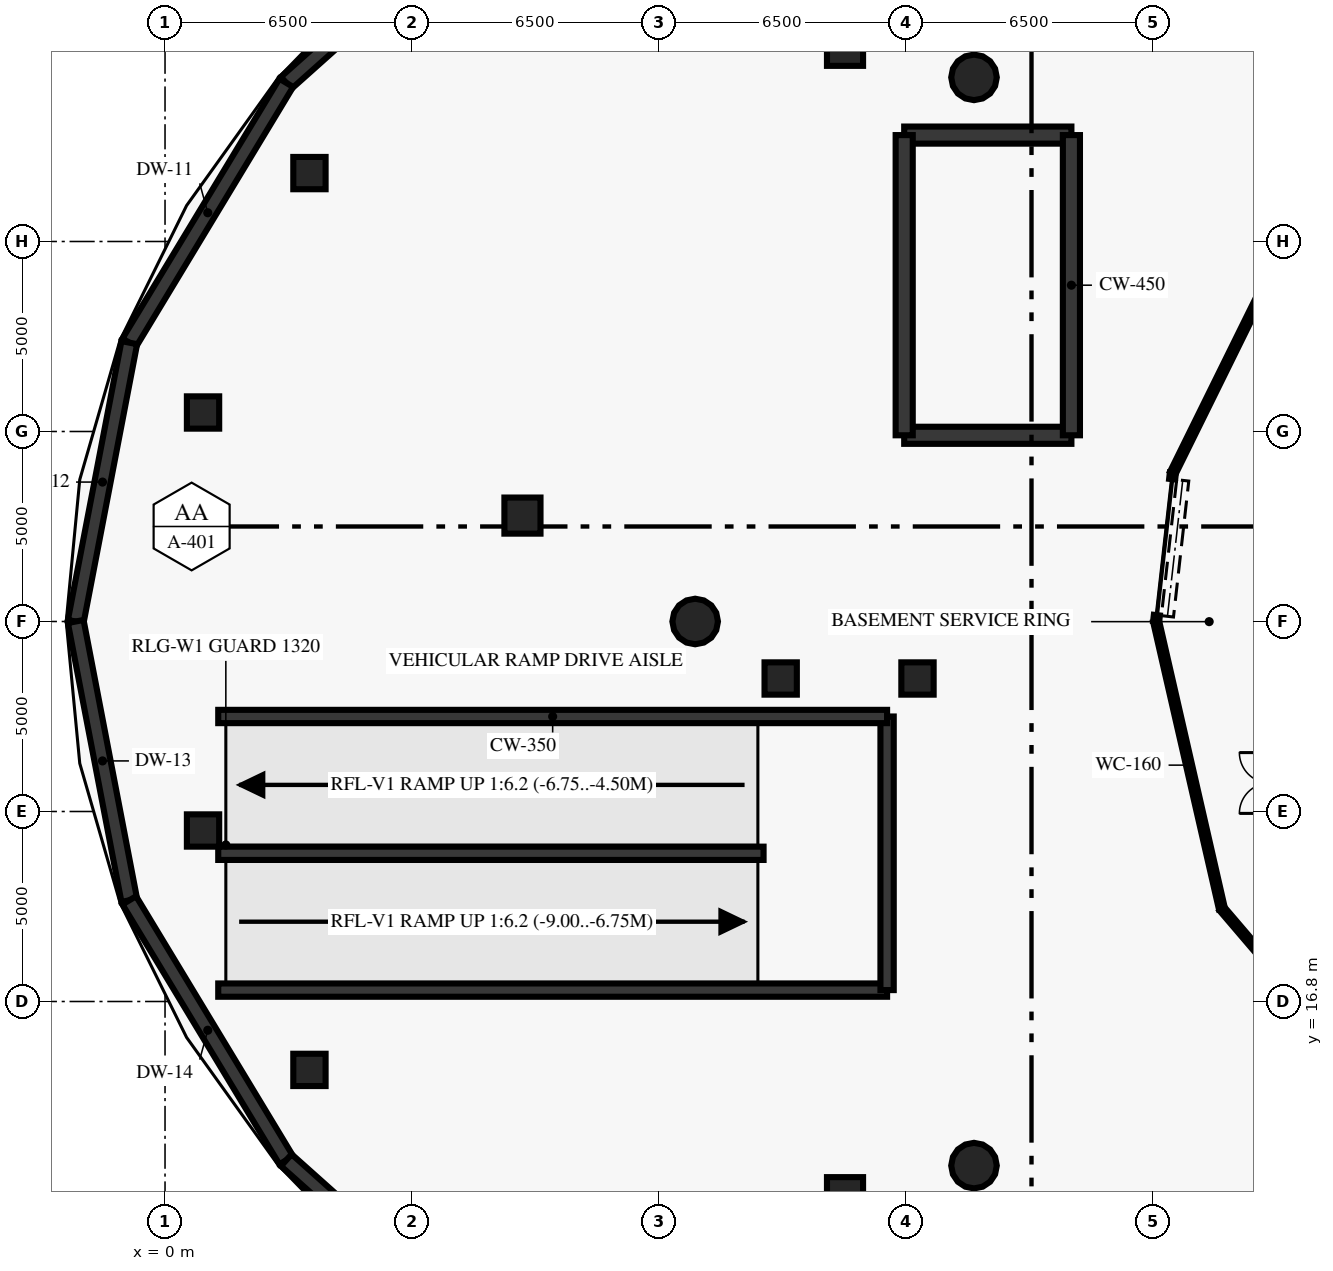
"""IFC4 building model, lengths in metres.
Left out: names, types, materials, properties, quantities, classifications, styles, units other than length and angle.
Written with IfcOpenShell. Run it as: python <this file> out.ifc"""

import sys

from ifc_helpers import new_model, si_unit, direction, frame, frame_2d, origin, origin_2d, place, context, subcontext, project, spatial, rectangle, circle, extrude, element, fill, save


model = new_model("IFC4")
c1 = context("Model", 3, precision=1e-05, world=origin(), true_north=direction((0.0, 1.0)))
c2 = subcontext(c1, "Body", "Model", "MODEL_VIEW")
j1 = project(units=[si_unit("LENGTHUNIT", "METRE"), si_unit("PLANEANGLEUNIT", "RADIAN")], contexts=[c1])
p1 = place(None, origin())
s1 = spatial("IfcSite", under=j1, at=p1, CompositionType="ELEMENT")
p2 = place(p1, origin())
s2 = spatial("IfcBuilding", under=s1, at=p2, CompositionType="ELEMENT")
p3 = place(p2, frame((0.0, 0.0, -9.0)))
s3 = spatial("IfcBuildingStorey", under=s2, at=p3, CompositionType="ELEMENT", Elevation=-9.0)
for number, where, z_axis, x_axis in (
    (1, (21.287, 41.119, 0.0), (0.0, 0.0, 1.0), (1.0, 0.0, 0.0)),
    (2, (13.95, 26.8, 0.0), (0.0, 0.0, 1.0), (1.0, 0.0, 0.0)),
    (3, (21.287, 12.481, 0.0), (0.0, 0.0, 1.0), (1.0, 0.0, 0.0)),
):
    element("IfcColumn", number, at=place(p3, frame(where, z_axis=z_axis, x_axis=x_axis)), inside=s3, PredefinedType="COLUMN", context=c2, shape_type="SweptSolid", body=[
        extrude(circle(Radius=0.6, at=origin_2d()), origin(), (0.0, 0.0, 1.0), 4.2),
    ])
for number, where, z_axis, x_axis in (
    (4, (17.893, 41.897, 0.0), (0.0, 0.0, 1.0), (1.0, 0.0, 0.0)),
    (5, (9.405, 29.587, 0.0), (0.0, 0.0, 1.0), (1.0, 0.0, 0.0)),
    (6, (17.893, 11.703, 0.0), (0.0, 0.0, 1.0), (1.0, 0.0, 0.0)),
):
    element("IfcColumn", number, at=place(p3, frame(where, z_axis=z_axis, x_axis=x_axis)), inside=s3, PredefinedType="COLUMN", context=c2, shape_type="SweptSolid", body=[
        extrude(rectangle(XDim=0.95, YDim=0.95, at=origin_2d()), origin(), (0.0, 0.0, 1.0), 4.2),
    ])
for number, where, z_axis, x_axis in (
    (7, (1.0, 21.3, 0.0), (0.0, 0.0, 1.0), (1.0, 0.0, 0.0)),
    (8, (3.8, 15.0, 0.0), (0.0, 0.0, 1.0), (1.0, 0.0, 0.0)),
    (9, (1.0, 32.3, 0.0), (0.0, 0.0, 1.0), (1.0, 0.0, 0.0)),
    (10, (3.8, 38.6, 0.0), (0.0, 0.0, 1.0), (1.0, 0.0, 0.0)),
    (11, (16.2, 25.3, 0.0), (0.0, 0.0, 1.0), (1.0, 0.0, 0.0)),
    (12, (19.8, 25.3, 0.0), (0.0, 0.0, 1.0), (1.0, 0.0, 0.0)),
):
    element("IfcColumn", number, at=place(p3, frame(where, z_axis=z_axis, x_axis=x_axis)), inside=s3, PredefinedType="COLUMN", context=c2, shape_type="SweptSolid", body=[
        extrude(rectangle(XDim=0.85, YDim=0.85, at=origin_2d()), origin(), (0.0, 0.0, 1.0), 4.2),
    ])
p4 = place(p3, frame((9.761, 46.846, 0.0), z_axis=(0.0, 0.0, 1.0), x_axis=(-0.745720826992, -0.666258544554, 0.0)))
e13 = element("IfcWall", 13, at=p4, inside=s3, PredefinedType="SHEAR", context=c2, shape_type="SweptSolid", body=[
    extrude(rectangle(XDim=8.812, YDim=0.42, at=frame_2d((4.406, 0.0))), origin(), (0.0, 0.0, 1.0), 4.2),
])
p5 = place(p3, frame((3.19, 40.975, 0.0), z_axis=(0.0, 0.0, 1.0), x_axis=(-0.517122636798, -0.85591131463, 0.0)))
e14 = element("IfcWall", 14, at=p5, inside=s3, PredefinedType="SHEAR", context=c2, shape_type="SweptSolid", body=[
    extrude(rectangle(XDim=7.988, YDim=0.42, at=frame_2d((3.994, 0.0))), origin(), (0.0, 0.0, 1.0), 4.2),
])
p6 = place(p3, frame((-0.941, 34.138, 0.0), z_axis=(0.0, 0.0, 1.0), x_axis=(-0.188595316219, -0.982054889861, 0.0)))
e15 = element("IfcWall", 15, at=p6, inside=s3, PredefinedType="SHEAR", context=c2, shape_type="SweptSolid", body=[
    extrude(rectangle(XDim=7.472, YDim=0.42, at=frame_2d((3.736, 0.0))), origin(), (0.0, 0.0, 1.0), 4.2),
])
p7 = place(p3, frame((-2.35, 26.8, 0.0), z_axis=(0.0, 0.0, 1.0), x_axis=(0.188589264795, -0.982056051966, 0.0)))
e16 = element("IfcWall", 16, at=p7, inside=s3, PredefinedType="SHEAR", context=c2, shape_type="SweptSolid", body=[
    extrude(rectangle(XDim=7.472, YDim=0.42, at=frame_2d((3.736, 0.0))), origin(), (0.0, 0.0, 1.0), 4.2),
])
p8 = place(p3, frame((-0.941, 19.462, 0.0), z_axis=(0.0, 0.0, 1.0), x_axis=(0.517136164524, -0.855903141332, 0.0)))
e17 = element("IfcWall", 17, at=p8, inside=s3, PredefinedType="SHEAR", context=c2, shape_type="SweptSolid", body=[
    extrude(rectangle(XDim=7.988, YDim=0.42, at=frame_2d((3.994, 0.0))), origin(), (0.0, 0.0, 1.0), 4.2),
])
p9 = place(p3, frame((3.19, 12.625, 0.0), z_axis=(0.0, 0.0, 1.0), x_axis=(0.745707061302, -0.666273951707, 0.0)))
e18 = element("IfcWall", 18, at=p9, inside=s3, PredefinedType="SHEAR", context=c2, shape_type="SweptSolid", body=[
    extrude(rectangle(XDim=8.812, YDim=0.42, at=frame_2d((4.406, 0.0))), origin(), (0.0, 0.0, 1.0), 4.2),
])
p10 = place(p3, frame((1.4, 17.1, 0.0), z_axis=(0.0, 0.0, 1.0), x_axis=(1.0, 0.0, 0.0)))
e19 = element("IfcWall", 19, at=p10, inside=s3, PredefinedType="SHEAR", context=c2, shape_type="SweptSolid", body=[
    extrude(rectangle(XDim=17.6, YDim=0.35, at=frame_2d((8.8, 0.0))), origin(), (0.0, 0.0, 1.0), 4.18),
])
p11 = place(p3, frame((19.0, 17.1, 0.0), z_axis=(0.0, 0.0, 1.0), x_axis=(0.0, 1.0, 0.0)))
e20 = element("IfcWall", 20, at=p11, inside=s3, PredefinedType="SHEAR", context=c2, shape_type="SweptSolid", body=[
    extrude(rectangle(XDim=7.2, YDim=0.35, at=frame_2d((3.6, 0.0))), origin(), (0.0, 0.0, 1.0), 4.18),
])
p12 = place(p3, frame((1.4, 24.3, 0.0), z_axis=(0.0, 0.0, 1.0), x_axis=(1.0, 0.0, 0.0)))
e21 = element("IfcWall", 21, at=p12, inside=s3, PredefinedType="SHEAR", context=c2, shape_type="SweptSolid", body=[
    extrude(rectangle(XDim=17.6, YDim=0.35, at=frame_2d((8.8, 0.0))), origin(), (0.0, 0.0, 1.0), 4.18),
])
p13 = place(p3, frame((1.4, 20.7, 0.0), z_axis=(0.0, 0.0, 1.0), x_axis=(1.0, 0.0, 0.0)))
e22 = element("IfcWall", 22, at=p13, inside=s3, PredefinedType="SHEAR", context=c2, shape_type="SweptSolid", body=[
    extrude(rectangle(XDim=14.35, YDim=0.35, at=frame_2d((7.175, 0.0))), origin(), (0.0, 0.0, 1.0), 4.18),
])
for number, where, z_axis, x_axis in (
    (23, (19.45, 31.7, 0.0), (0.0, 0.0, 1.0), (1.0, 0.0, 0.0)),
    (24, (19.45, 39.6, 0.0), (0.0, 0.0, 1.0), (1.0, 0.0, 0.0)),
):
    element("IfcWall", number, at=place(p3, frame(where, z_axis=z_axis, x_axis=x_axis)), inside=s3, PredefinedType="SHEAR", context=c2, shape_type="SweptSolid", body=[
        extrude(rectangle(XDim=4.4, YDim=0.45, at=frame_2d((2.2, 0.0))), origin(), (0.0, 0.0, 1.0), 4.2),
    ])
for number, where, z_axis, x_axis in (
    (25, (19.45, 31.7, 0.0), (0.0, 0.0, 1.0), (0.0, 1.0, 0.0)),
    (26, (23.85, 31.7, 0.0), (0.0, 0.0, 1.0), (0.0, 1.0, 0.0)),
):
    element("IfcWall", number, at=place(p3, frame(where, z_axis=z_axis, x_axis=x_axis)), inside=s3, PredefinedType="SHEAR", context=c2, shape_type="SweptSolid", body=[
        extrude(rectangle(XDim=7.9, YDim=0.45, at=frame_2d((3.95, 0.0))), origin(), (0.0, 0.0, 1.0), 4.2),
    ])
p14 = place(p3, frame((29.864, 37.491, 0.0), z_axis=(0.0, 0.0, 1.0), x_axis=(-0.44243947754, -0.896798365696, 0.0)))
e27 = element("IfcWall", 27, at=p14, inside=s3, PredefinedType="PARTITIONING", context=c2, shape_type="SweptSolid", body=[
    extrude(rectangle(XDim=7.558, YDim=0.16, at=frame_2d((3.779, 0.0))), origin(), (0.0, 0.0, 1.0), 4.2),
])
p15 = place(p3, frame((26.52, 30.713, 0.0), z_axis=(0.0, 0.0, 1.0), x_axis=(-0.111731247657, -0.993738460711, 0.0)))
e28 = element("IfcWall", 28, at=p15, inside=s3, PredefinedType="PARTITIONING", context=c2, shape_type="SweptSolid", body=[
    extrude(rectangle(XDim=3.938, YDim=0.16, at=frame_2d((1.969, 0.0))), origin(), (0.0, 0.0, 1.0), 4.2),
])
p16 = place(p15, frame((0.169, 0.0, 0.0)))
e29 = element("IfcOpeningElement", 29, at=p16, cuts=e28, PredefinedType="OPENING", context=c2, shape_type="SweptSolid", body=[
    extrude(rectangle(XDim=3.6, YDim=2.4, at=frame_2d((1.8, 1.2))), frame((0.0, 0.09, 0.0), z_axis=(0.0, -1.0, 0.0), x_axis=(1.0, 0.0, 0.0)), (0.0, 0.0, 1.0), 0.18),
])
p17 = place(p3, frame((26.08, 26.8, 0.0), z_axis=(0.0, 0.0, 1.0), x_axis=(0.223185487206, -0.974775993909, 0.0)))
e30 = element("IfcWall", 30, at=p17, inside=s3, PredefinedType="PARTITIONING", context=c2, shape_type="SweptSolid", body=[
    extrude(rectangle(XDim=7.756, YDim=0.16, at=frame_2d((3.878, 0.0))), origin(), (0.0, 0.0, 1.0), 4.2),
])
p18 = place(p3, frame((27.811, 19.24, 0.0), z_axis=(0.0, 0.0, 1.0), x_axis=(0.649652680018, -0.760231145998, 0.0)))
e31 = element("IfcWall", 31, at=p18, inside=s3, PredefinedType="PARTITIONING", context=c2, shape_type="SweptSolid", body=[
    extrude(rectangle(XDim=7.279, YDim=0.16, at=frame_2d((3.64, 0.0))), origin(), (0.0, 0.0, 1.0), 4.2),
])
p19 = place(p16, origin())
e32 = element("IfcDoor", 32, at=p19, inside=s3, OperationType="ROLLINGUP", PredefinedType="GATE", context=c2, shape_type="SweptSolid", body=[
    extrude(rectangle(XDim=3.6, YDim=2.4, at=frame_2d((1.8, 1.2))), frame((0.0, 0.025, 0.0), z_axis=(0.0, -1.0, 0.0), x_axis=(1.0, 0.0, 0.0)), (0.0, 0.0, 1.0), 0.05),
])
fill(e29, e32)
save(model, sys.argv[1])
